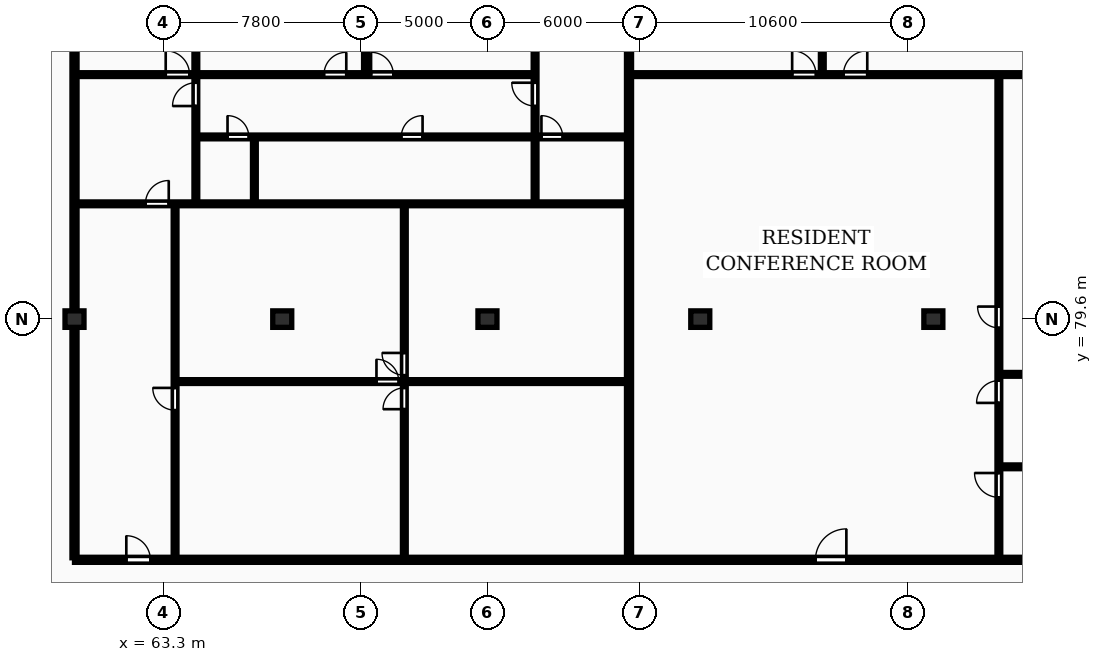
"""IFC4 building model, lengths in metres.
Left out: names, types, materials, properties, quantities, classifications, styles, units other than length and angle.
Written with IfcOpenShell. Run it as: python <this file> out.ifc"""

import sys

from ifc_helpers import new_model, si_unit, direction, frame, frame_2d, origin, origin_2d, place, context, subcontext, project, spatial, rectangle, extrude, element, fill, save


model = new_model("IFC4")
c1 = context("Model", 3, precision=1e-05, world=origin(), true_north=direction((0.0, 1.0)))
c2 = subcontext(c1, "Body", "Model", "MODEL_VIEW")
j1 = project(units=[si_unit("LENGTHUNIT", "METRE"), si_unit("PLANEANGLEUNIT", "RADIAN")], contexts=[c1])
p1 = place(None, origin())
s1 = spatial("IfcSite", under=j1, at=p1, CompositionType="ELEMENT")
p2 = place(p1, origin())
s2 = spatial("IfcBuilding", under=s1, at=p2, CompositionType="ELEMENT")
p3 = place(p2, frame((0.0, 0.0, 228.65)))
s3 = spatial("IfcBuildingStorey", under=s2, at=p3, CompositionType="ELEMENT", Elevation=228.65)
for number, where, z_axis, x_axis in (
    (1, (59.8, 79.6, 0.0), (0.0, 0.0, 1.0), (1.0, 0.0, 0.0)),
    (2, (68.0, 79.6, 0.0), (0.0, 0.0, 1.0), (1.0, 0.0, 0.0)),
    (3, (76.1, 79.6, 0.0), (0.0, 0.0, 1.0), (1.0, 0.0, 0.0)),
    (4, (84.5, 79.6, 0.0), (0.0, 0.0, 1.0), (1.0, 0.0, 0.0)),
    (5, (93.7, 79.6, 0.0), (0.0, 0.0, 1.0), (1.0, 0.0, 0.0)),
):
    element("IfcColumn", number, at=place(p3, frame(where, z_axis=z_axis, x_axis=x_axis)), inside=s3, PredefinedType="COLUMN", context=c2, shape_type="SweptSolid", body=[
        extrude(rectangle(XDim=0.75, YDim=0.65, at=origin_2d()), origin(), (0.0, 0.0, 1.0), 3.45),
    ])
p4 = place(p3, frame((59.8, 70.18, 0.0), z_axis=(0.0, 0.0, 1.0), x_axis=(0.0, 1.0, 0.0)))
e6 = element("IfcWall", 6, at=p4, inside=s3, PredefinedType="PARTITIONING", context=c2, shape_type="SweptSolid", body=[
    extrude(rectangle(XDim=24.32, YDim=0.2, at=frame_2d((12.16, 0.0))), origin(), (0.0, 0.0, 1.0), 2.477),
])
p5 = place(p3, frame((81.687, 70.18, 0.0), z_axis=(0.0, 0.0, 1.0), x_axis=(0.0, 1.0, 0.0)))
e7 = element("IfcWall", 7, at=p5, inside=s3, PredefinedType="PARTITIONING", context=c2, shape_type="SweptSolid", body=[
    extrude(rectangle(XDim=24.32, YDim=0.2, at=frame_2d((12.16, 0.0))), origin(), (0.0, 0.0, 1.0), 3.17),
])
p6 = place(p3, frame((72.819, 70.16, 0.0), z_axis=(0.0, 0.0, 1.0), x_axis=(0.0, 1.0, 0.0)))
e8 = element("IfcWall", 8, at=p6, inside=s3, PredefinedType="PARTITIONING", context=c2, shape_type="SweptSolid", body=[
    extrude(rectangle(XDim=13.95, YDim=0.15, at=frame_2d((6.975, 0.0))), origin(), (0.0, 0.0, 1.0), 3.17),
])
p7 = place(p6, frame((5.885, 0.0, 0.0)))
e9 = element("IfcOpeningElement", 9, at=p7, cuts=e8, PredefinedType="OPENING", context=c2, shape_type="SweptSolid", body=[
    extrude(rectangle(XDim=0.84, YDim=2.04, at=frame_2d((0.42, 1.02))), frame((0.0, 0.085, 0.0), z_axis=(0.0, -1.0, 0.0), x_axis=(1.0, 0.0, 0.0)), (0.0, 0.0, 1.0), 0.17),
])
p8 = place(p6, frame((7.225, 0.0, 0.0)))
e10 = element("IfcOpeningElement", 10, at=p8, cuts=e8, PredefinedType="OPENING", context=c2, shape_type="SweptSolid", body=[
    extrude(rectangle(XDim=0.88, YDim=2.06, at=frame_2d((0.44, 1.03))), frame((0.0, 0.085, 0.0), z_axis=(0.0, -1.0, 0.0), x_axis=(1.0, 0.0, 0.0)), (0.0, 0.0, 1.0), 0.17),
])
p9 = place(p3, frame((63.83, 77.135, 0.0), z_axis=(0.0, 0.0, 1.0), x_axis=(1.0, 0.0, 0.0)))
e11 = element("IfcWall", 11, at=p9, inside=s3, PredefinedType="PARTITIONING", context=c2, shape_type="SweptSolid", body=[
    extrude(rectangle(XDim=17.777, YDim=0.15, at=frame_2d((8.889, 0.0))), origin(), (0.0, 0.0, 1.0), 3.17),
])
p10 = place(p9, frame((7.889, 0.0, 0.0)))
e12 = element("IfcOpeningElement", 12, at=p10, cuts=e11, PredefinedType="OPENING", context=c2, shape_type="SweptSolid", body=[
    extrude(rectangle(XDim=0.88, YDim=2.06, at=frame_2d((0.44, 1.03))), frame((0.0, 0.085, 0.0), z_axis=(0.0, -1.0, 0.0), x_axis=(1.0, 0.0, 0.0)), (0.0, 0.0, 1.0), 0.17),
])
p11 = place(p3, frame((63.77, 70.16, 0.0), z_axis=(0.0, 0.0, 1.0), x_axis=(0.0, 1.0, 0.0)))
e13 = element("IfcWall", 13, at=p11, inside=s3, PredefinedType="PARTITIONING", context=c2, shape_type="SweptSolid", body=[
    extrude(rectangle(XDim=13.95, YDim=0.15, at=frame_2d((6.975, 0.0))), origin(), (0.0, 0.0, 1.0), 3.17),
])
p12 = place(p11, frame((5.845, 0.0, 0.0)))
e14 = element("IfcOpeningElement", 14, at=p12, cuts=e13, PredefinedType="OPENING", context=c2, shape_type="SweptSolid", body=[
    extrude(rectangle(XDim=0.88, YDim=2.06, at=frame_2d((0.44, 1.03))), frame((0.0, 0.085, 0.0), z_axis=(0.0, -1.0, 0.0), x_axis=(1.0, 0.0, 0.0)), (0.0, 0.0, 1.0), 0.17),
])
p13 = place(p3, frame((66.9, 84.19, 0.0), z_axis=(0.0, 0.0, 1.0), x_axis=(0.0, 1.0, 0.0)))
e15 = element("IfcWall", 15, at=p13, inside=s3, PredefinedType="PARTITIONING", context=c2, shape_type="SweptSolid", body=[
    extrude(rectangle(XDim=2.58, YDim=0.15, at=frame_2d((1.29, 0.0))), origin(), (0.0, 0.0, 1.0), 3.17),
])
p14 = place(p3, frame((71.285, 89.33, 0.0), z_axis=(0.0, 0.0, 1.0), x_axis=(0.0, 1.0, 0.0)))
e16 = element("IfcWall", 16, at=p14, inside=s3, PredefinedType="PARTITIONING", context=c2, shape_type="SweptSolid", body=[
    extrude(rectangle(XDim=5.17, YDim=0.15, at=frame_2d((2.585, 0.0))), origin(), (0.0, 0.0, 1.0), 3.17),
])
p15 = place(p3, frame((64.59, 84.19, 0.0), z_axis=(0.0, 0.0, 1.0), x_axis=(0.0, 1.0, 0.0)))
e17 = element("IfcWall", 17, at=p15, inside=s3, PredefinedType="PARTITIONING", context=c2, shape_type="SweptSolid", body=[
    extrude(rectangle(XDim=10.31, YDim=0.15, at=frame_2d((5.155, 0.0))), origin(), (0.0, 0.0, 1.0), 3.17),
])
p16 = place(p15, frame((3.82, 0.0, 0.0)))
e18 = element("IfcOpeningElement", 18, at=p16, cuts=e17, PredefinedType="OPENING", context=c2, shape_type="SweptSolid", body=[
    extrude(rectangle(XDim=0.92, YDim=2.08, at=frame_2d((0.46, 1.04))), frame((0.0, 0.085, 0.0), z_axis=(0.0, -1.0, 0.0), x_axis=(1.0, 0.0, 0.0)), (0.0, 0.0, 1.0), 0.17),
])
p17 = place(p3, frame((77.98, 84.19, 0.0), z_axis=(0.0, 0.0, 1.0), x_axis=(0.0, 1.0, 0.0)))
e19 = element("IfcWall", 19, at=p17, inside=s3, PredefinedType="PARTITIONING", context=c2, shape_type="SweptSolid", body=[
    extrude(rectangle(XDim=2.58, YDim=0.15, at=frame_2d((1.29, 0.0))), origin(), (0.0, 0.0, 1.0), 3.17),
])
p18 = place(p3, frame((77.98, 86.81, 0.0), z_axis=(0.0, 0.0, 1.0), x_axis=(0.0, 1.0, 0.0)))
e20 = element("IfcWall", 20, at=p18, inside=s3, PredefinedType="PARTITIONING", context=c2, shape_type="SweptSolid", body=[
    extrude(rectangle(XDim=7.69, YDim=0.15, at=frame_2d((3.845, 0.0))), origin(), (0.0, 0.0, 1.0), 3.17),
])
p19 = place(p18, frame((1.2, 0.0, 0.0)))
e21 = element("IfcOpeningElement", 21, at=p19, cuts=e20, PredefinedType="OPENING", context=c2, shape_type="SweptSolid", body=[
    extrude(rectangle(XDim=0.92, YDim=2.08, at=frame_2d((0.46, 1.04))), frame((0.0, 0.085, 0.0), z_axis=(0.0, -1.0, 0.0), x_axis=(1.0, 0.0, 0.0)), (0.0, 0.0, 1.0), 0.17),
])
p20 = place(p3, frame((64.63, 86.79, 0.0), z_axis=(0.0, 0.0, 1.0), x_axis=(1.0, 0.0, 0.0)))
e22 = element("IfcWall", 22, at=p20, inside=s3, PredefinedType="PARTITIONING", context=c2, shape_type="SweptSolid", body=[
    extrude(rectangle(XDim=16.978, YDim=0.15, at=frame_2d((8.489, 0.0))), origin(), (0.0, 0.0, 1.0), 3.17),
])
p21 = place(p20, frame((1.21, 0.0, 0.0)))
e23 = element("IfcOpeningElement", 23, at=p21, cuts=e22, PredefinedType="OPENING", context=c2, shape_type="SweptSolid", body=[
    extrude(rectangle(XDim=0.84, YDim=2.04, at=frame_2d((0.42, 1.02))), frame((0.0, 0.085, 0.0), z_axis=(0.0, -1.0, 0.0), x_axis=(1.0, 0.0, 0.0)), (0.0, 0.0, 1.0), 0.17),
])
p22 = place(p20, frame((8.069, 0.0, 0.0)))
e24 = element("IfcOpeningElement", 24, at=p22, cuts=e22, PredefinedType="OPENING", context=c2, shape_type="SweptSolid", body=[
    extrude(rectangle(XDim=0.84, YDim=2.04, at=frame_2d((0.42, 1.02))), frame((0.0, 0.085, 0.0), z_axis=(0.0, -1.0, 0.0), x_axis=(1.0, 0.0, 0.0)), (0.0, 0.0, 1.0), 0.17),
])
p23 = place(p20, frame((13.6, 0.0, 0.0)))
e25 = element("IfcOpeningElement", 25, at=p23, cuts=e22, PredefinedType="OPENING", context=c2, shape_type="SweptSolid", body=[
    extrude(rectangle(XDim=0.84, YDim=2.04, at=frame_2d((0.42, 1.02))), frame((0.0, 0.085, 0.0), z_axis=(0.0, -1.0, 0.0), x_axis=(1.0, 0.0, 0.0)), (0.0, 0.0, 1.0), 0.17),
])
p24 = place(p3, frame((59.88, 84.15, 0.0), z_axis=(0.0, 0.0, 1.0), x_axis=(1.0, 0.0, 0.0)))
e26 = element("IfcWall", 26, at=p24, inside=s3, PredefinedType="PARTITIONING", context=c2, shape_type="SweptSolid", body=[
    extrude(rectangle(XDim=21.728, YDim=0.15, at=frame_2d((10.864, 0.0))), origin(), (0.0, 0.0, 1.0), 3.17),
])
p25 = place(p24, frame((2.72, 0.0, 0.0)))
e27 = element("IfcOpeningElement", 27, at=p25, cuts=e26, PredefinedType="OPENING", context=c2, shape_type="SweptSolid", body=[
    extrude(rectangle(XDim=0.92, YDim=2.08, at=frame_2d((0.46, 1.04))), frame((0.0, 0.085, 0.0), z_axis=(0.0, -1.0, 0.0), x_axis=(1.0, 0.0, 0.0)), (0.0, 0.0, 1.0), 0.17),
])
p26 = place(p3, frame((59.88, 89.25, 0.0), z_axis=(0.0, 0.0, 1.0), x_axis=(1.0, 0.0, 0.0)))
e28 = element("IfcWall", 28, at=p26, inside=s3, PredefinedType="PARTITIONING", context=c2, shape_type="SweptSolid", body=[
    extrude(rectangle(XDim=18.1, YDim=0.15, at=frame_2d((9.05, 0.0))), origin(), (0.0, 0.0, 1.0), 3.17),
])
p27 = place(p26, frame((3.52, 0.0, 0.0)))
e29 = element("IfcOpeningElement", 29, at=p27, cuts=e28, PredefinedType="OPENING", context=c2, shape_type="SweptSolid", body=[
    extrude(rectangle(XDim=0.94, YDim=2.1, at=frame_2d((0.47, 1.05))), frame((0.0, 0.085, 0.0), z_axis=(0.0, -1.0, 0.0), x_axis=(1.0, 0.0, 0.0)), (0.0, 0.0, 1.0), 0.17),
])
p28 = place(p26, frame((9.768, 0.0, 0.0)))
e30 = element("IfcOpeningElement", 30, at=p28, cuts=e28, PredefinedType="OPENING", context=c2, shape_type="SweptSolid", body=[
    extrude(rectangle(XDim=0.88, YDim=2.06, at=frame_2d((0.44, 1.03))), frame((0.0, 0.085, 0.0), z_axis=(0.0, -1.0, 0.0), x_axis=(1.0, 0.0, 0.0)), (0.0, 0.0, 1.0), 0.17),
])
p29 = place(p26, frame((11.625, 0.0, 0.0)))
e31 = element("IfcOpeningElement", 31, at=p29, cuts=e28, PredefinedType="OPENING", context=c2, shape_type="SweptSolid", body=[
    extrude(rectangle(XDim=0.88, YDim=2.06, at=frame_2d((0.44, 1.03))), frame((0.0, 0.085, 0.0), z_axis=(0.0, -1.0, 0.0), x_axis=(1.0, 0.0, 0.0)), (0.0, 0.0, 1.0), 0.17),
])
for number, where, z_axis, x_axis in (
    (32, (96.346, 73.77, 0.0), (0.0, 0.0, 1.0), (1.0, 0.0, 0.0)),
    (33, (96.346, 77.42, 0.0), (0.0, 0.0, 1.0), (1.0, 0.0, 0.0)),
):
    element("IfcWall", number, at=place(p3, frame(where, z_axis=z_axis, x_axis=x_axis)), inside=s3, PredefinedType="PARTITIONING", context=c2, shape_type="SweptSolid", body=[
        extrude(rectangle(XDim=3.13, YDim=0.15, at=frame_2d((1.565, 0.0))), origin(), (0.0, 0.0, 1.0), 3.17),
    ])
p30 = place(p3, frame((96.286, 70.16, 0.0), z_axis=(0.0, 0.0, 1.0), x_axis=(0.0, 1.0, 0.0)))
e34 = element("IfcWall", 34, at=p30, inside=s3, PredefinedType="PARTITIONING", context=c2, shape_type="SweptSolid", body=[
    extrude(rectangle(XDim=19.03, YDim=0.15, at=frame_2d((9.515, 0.0))), origin(), (0.0, 0.0, 1.0), 3.17),
])
p31 = place(p30, frame((2.406, 0.0, 0.0)))
e35 = element("IfcOpeningElement", 35, at=p31, cuts=e34, PredefinedType="OPENING", context=c2, shape_type="SweptSolid", body=[
    extrude(rectangle(XDim=0.96, YDim=2.1, at=frame_2d((0.48, 1.05))), frame((0.0, 0.085, 0.0), z_axis=(0.0, -1.0, 0.0), x_axis=(1.0, 0.0, 0.0)), (0.0, 0.0, 1.0), 0.17),
])
p32 = place(p30, frame((6.133, 0.0, 0.0)))
e36 = element("IfcOpeningElement", 36, at=p32, cuts=e34, PredefinedType="OPENING", context=c2, shape_type="SweptSolid", body=[
    extrude(rectangle(XDim=0.88, YDim=2.06, at=frame_2d((0.44, 1.03))), frame((0.0, 0.085, 0.0), z_axis=(0.0, -1.0, 0.0), x_axis=(1.0, 0.0, 0.0)), (0.0, 0.0, 1.0), 0.17),
])
p33 = place(p30, frame((9.095, 0.0, 0.0)))
e37 = element("IfcOpeningElement", 37, at=p33, cuts=e34, PredefinedType="OPENING", context=c2, shape_type="SweptSolid", body=[
    extrude(rectangle(XDim=0.84, YDim=2.04, at=frame_2d((0.42, 1.02))), frame((0.0, 0.085, 0.0), z_axis=(0.0, -1.0, 0.0), x_axis=(1.0, 0.0, 0.0)), (0.0, 0.0, 1.0), 0.17),
])
p34 = place(p3, frame((89.316, 89.33, 0.0), z_axis=(0.0, 0.0, 1.0), x_axis=(0.0, 1.0, 0.0)))
e38 = element("IfcWall", 38, at=p34, inside=s3, PredefinedType="PARTITIONING", context=c2, shape_type="SweptSolid", body=[
    extrude(rectangle(XDim=5.17, YDim=0.15, at=frame_2d((2.585, 0.0))), origin(), (0.0, 0.0, 1.0), 3.17),
])
p35 = place(p3, frame((81.767, 89.25, 0.0), z_axis=(0.0, 0.0, 1.0), x_axis=(1.0, 0.0, 0.0)))
e39 = element("IfcWall", 39, at=p35, inside=s3, PredefinedType="PARTITIONING", context=c2, shape_type="SweptSolid", body=[
    extrude(rectangle(XDim=17.708, YDim=0.15, at=frame_2d((8.854, 0.0))), origin(), (0.0, 0.0, 1.0), 3.17),
])
p36 = place(p35, frame((6.359, 0.0, 0.0)))
e40 = element("IfcOpeningElement", 40, at=p36, cuts=e39, PredefinedType="OPENING", context=c2, shape_type="SweptSolid", body=[
    extrude(rectangle(XDim=0.94, YDim=2.1, at=frame_2d((0.47, 1.05))), frame((0.0, 0.085, 0.0), z_axis=(0.0, -1.0, 0.0), x_axis=(1.0, 0.0, 0.0)), (0.0, 0.0, 1.0), 0.17),
])
p37 = place(p35, frame((8.384, 0.0, 0.0)))
e41 = element("IfcOpeningElement", 41, at=p37, cuts=e39, PredefinedType="OPENING", context=c2, shape_type="SweptSolid", body=[
    extrude(rectangle(XDim=0.94, YDim=2.1, at=frame_2d((0.47, 1.05))), frame((0.0, 0.085, 0.0), z_axis=(0.0, -1.0, 0.0), x_axis=(1.0, 0.0, 0.0)), (0.0, 0.0, 1.0), 0.17),
])
p38 = place(p3, frame((59.8, 70.1, 0.0), z_axis=(0.0, 0.0, 1.0), x_axis=(1.0, 0.0, 0.0)))
e42 = element("IfcWall", 42, at=p38, inside=s3, PredefinedType="PARTITIONING", context=c2, shape_type="SweptSolid", body=[
    extrude(rectangle(XDim=68.6, YDim=0.2, at=frame_2d((34.3, 0.0))), origin(), (0.0, 0.0, 1.0), 3.17),
])
p39 = place(p38, frame((2.045, 0.0, 0.0)))
e43 = element("IfcOpeningElement", 43, at=p39, cuts=e42, PredefinedType="OPENING", context=c2, shape_type="SweptSolid", body=[
    extrude(rectangle(XDim=0.95, YDim=2.15, at=frame_2d((0.475, 1.075))), frame((0.0, 0.11, 0.0), z_axis=(0.0, -1.0, 0.0), x_axis=(1.0, 0.0, 0.0)), (0.0, 0.0, 1.0), 0.22),
])
p40 = place(p38, frame((29.246, 0.0, 0.0)))
e44 = element("IfcOpeningElement", 44, at=p40, cuts=e42, PredefinedType="OPENING", context=c2, shape_type="SweptSolid", body=[
    extrude(rectangle(XDim=1.22, YDim=2.18, at=frame_2d((0.61, 1.09))), frame((0.0, 0.11, 0.0), z_axis=(0.0, -1.0, 0.0), x_axis=(1.0, 0.0, 0.0)), (0.0, 0.0, 1.0), 0.22),
])
p41 = place(p38, frame((41.801, 0.0, 0.0)))
e45 = element("IfcOpeningElement", 45, at=p41, cuts=e42, PredefinedType="OPENING", context=c2, shape_type="SweptSolid", body=[
    extrude(rectangle(XDim=0.95, YDim=2.15, at=frame_2d((0.475, 1.075))), frame((0.0, 0.11, 0.0), z_axis=(0.0, -1.0, 0.0), x_axis=(1.0, 0.0, 0.0)), (0.0, 0.0, 1.0), 0.22),
])
p42 = place(p38, frame((59.115, 0.0, 0.0)))
e46 = element("IfcOpeningElement", 46, at=p42, cuts=e42, PredefinedType="OPENING", context=c2, shape_type="SweptSolid", body=[
    extrude(rectangle(XDim=0.95, YDim=2.15, at=frame_2d((0.475, 1.075))), frame((0.0, 0.11, 0.0), z_axis=(0.0, -1.0, 0.0), x_axis=(1.0, 0.0, 0.0)), (0.0, 0.0, 1.0), 0.22),
])
p43 = place(p7, origin())
e47 = element("IfcDoor", 47, at=p43, inside=s3, OperationType="SINGLE_SWING_LEFT", PredefinedType="DOOR", context=c2, shape_type="SweptSolid", body=[
    extrude(rectangle(XDim=0.84, YDim=2.04, at=frame_2d((0.42, 1.02))), frame((0.0, 0.025, 0.0), z_axis=(0.0, -1.0, 0.0), x_axis=(1.0, 0.0, 0.0)), (0.0, 0.0, 1.0), 0.05),
])
fill(e9, e47)
p44 = place(p8, origin())
e48 = element("IfcDoor", 48, at=p44, inside=s3, OperationType="SINGLE_SWING_RIGHT", PredefinedType="DOOR", context=c2, shape_type="SweptSolid", body=[
    extrude(rectangle(XDim=0.88, YDim=2.06, at=frame_2d((0.44, 1.03))), frame((0.0, 0.025, 0.0), z_axis=(0.0, -1.0, 0.0), x_axis=(1.0, 0.0, 0.0)), (0.0, 0.0, 1.0), 0.05),
])
fill(e10, e48)
p45 = place(p10, origin())
e49 = element("IfcDoor", 49, at=p45, inside=s3, OperationType="SINGLE_SWING_LEFT", PredefinedType="DOOR", context=c2, shape_type="SweptSolid", body=[
    extrude(rectangle(XDim=0.88, YDim=2.06, at=frame_2d((0.44, 1.03))), frame((0.0, 0.025, 0.0), z_axis=(0.0, -1.0, 0.0), x_axis=(1.0, 0.0, 0.0)), (0.0, 0.0, 1.0), 0.05),
])
fill(e12, e49)
p46 = place(p12, origin())
e50 = element("IfcDoor", 50, at=p46, inside=s3, OperationType="SINGLE_SWING_RIGHT", PredefinedType="DOOR", context=c2, shape_type="SweptSolid", body=[
    extrude(rectangle(XDim=0.88, YDim=2.06, at=frame_2d((0.44, 1.03))), frame((0.0, 0.025, 0.0), z_axis=(0.0, -1.0, 0.0), x_axis=(1.0, 0.0, 0.0)), (0.0, 0.0, 1.0), 0.05),
])
fill(e14, e50)
p47 = place(p16, origin())
e51 = element("IfcDoor", 51, at=p47, inside=s3, OperationType="SINGLE_SWING_LEFT", PredefinedType="DOOR", context=c2, shape_type="SweptSolid", body=[
    extrude(rectangle(XDim=0.92, YDim=2.08, at=frame_2d((0.46, 1.04))), frame((0.0, 0.025, 0.0), z_axis=(0.0, -1.0, 0.0), x_axis=(1.0, 0.0, 0.0)), (0.0, 0.0, 1.0), 0.05),
])
fill(e18, e51)
p48 = place(p19, origin())
e52 = element("IfcDoor", 52, at=p48, inside=s3, OperationType="SINGLE_SWING_RIGHT", PredefinedType="DOOR", context=c2, shape_type="SweptSolid", body=[
    extrude(rectangle(XDim=0.92, YDim=2.08, at=frame_2d((0.46, 1.04))), frame((0.0, 0.025, 0.0), z_axis=(0.0, -1.0, 0.0), x_axis=(1.0, 0.0, 0.0)), (0.0, 0.0, 1.0), 0.05),
])
fill(e21, e52)
p49 = place(p21, origin())
e53 = element("IfcDoor", 53, at=p49, inside=s3, OperationType="SINGLE_SWING_LEFT", PredefinedType="DOOR", context=c2, shape_type="SweptSolid", body=[
    extrude(rectangle(XDim=0.84, YDim=2.04, at=frame_2d((0.42, 1.02))), frame((0.0, 0.025, 0.0), z_axis=(0.0, -1.0, 0.0), x_axis=(1.0, 0.0, 0.0)), (0.0, 0.0, 1.0), 0.05),
])
fill(e23, e53)
p50 = place(p22, origin())
e54 = element("IfcDoor", 54, at=p50, inside=s3, OperationType="SINGLE_SWING_RIGHT", PredefinedType="DOOR", context=c2, shape_type="SweptSolid", body=[
    extrude(rectangle(XDim=0.84, YDim=2.04, at=frame_2d((0.42, 1.02))), frame((0.0, 0.025, 0.0), z_axis=(0.0, -1.0, 0.0), x_axis=(1.0, 0.0, 0.0)), (0.0, 0.0, 1.0), 0.05),
])
fill(e24, e54)
p51 = place(p23, origin())
e55 = element("IfcDoor", 55, at=p51, inside=s3, OperationType="SINGLE_SWING_LEFT", PredefinedType="DOOR", context=c2, shape_type="SweptSolid", body=[
    extrude(rectangle(XDim=0.84, YDim=2.04, at=frame_2d((0.42, 1.02))), frame((0.0, 0.025, 0.0), z_axis=(0.0, -1.0, 0.0), x_axis=(1.0, 0.0, 0.0)), (0.0, 0.0, 1.0), 0.05),
])
fill(e25, e55)
p52 = place(p25, origin())
e56 = element("IfcDoor", 56, at=p52, inside=s3, OperationType="SINGLE_SWING_RIGHT", PredefinedType="DOOR", context=c2, shape_type="SweptSolid", body=[
    extrude(rectangle(XDim=0.92, YDim=2.08, at=frame_2d((0.46, 1.04))), frame((0.0, 0.025, 0.0), z_axis=(0.0, -1.0, 0.0), x_axis=(1.0, 0.0, 0.0)), (0.0, 0.0, 1.0), 0.05),
])
fill(e27, e56)
p53 = place(p27, origin())
e57 = element("IfcDoor", 57, at=p53, inside=s3, OperationType="SINGLE_SWING_LEFT", PredefinedType="DOOR", context=c2, shape_type="SweptSolid", body=[
    extrude(rectangle(XDim=0.94, YDim=2.1, at=frame_2d((0.47, 1.05))), frame((0.0, 0.025, 0.0), z_axis=(0.0, -1.0, 0.0), x_axis=(1.0, 0.0, 0.0)), (0.0, 0.0, 1.0), 0.05),
])
fill(e29, e57)
p54 = place(p28, origin())
e58 = element("IfcDoor", 58, at=p54, inside=s3, OperationType="SINGLE_SWING_RIGHT", PredefinedType="DOOR", context=c2, shape_type="SweptSolid", body=[
    extrude(rectangle(XDim=0.88, YDim=2.06, at=frame_2d((0.44, 1.03))), frame((0.0, 0.025, 0.0), z_axis=(0.0, -1.0, 0.0), x_axis=(1.0, 0.0, 0.0)), (0.0, 0.0, 1.0), 0.05),
])
fill(e30, e58)
p55 = place(p29, origin())
e59 = element("IfcDoor", 59, at=p55, inside=s3, OperationType="SINGLE_SWING_LEFT", PredefinedType="DOOR", context=c2, shape_type="SweptSolid", body=[
    extrude(rectangle(XDim=0.88, YDim=2.06, at=frame_2d((0.44, 1.03))), frame((0.0, 0.025, 0.0), z_axis=(0.0, -1.0, 0.0), x_axis=(1.0, 0.0, 0.0)), (0.0, 0.0, 1.0), 0.05),
])
fill(e31, e59)
p56 = place(p31, origin())
e60 = element("IfcDoor", 60, at=p56, inside=s3, OperationType="SINGLE_SWING_RIGHT", PredefinedType="DOOR", context=c2, shape_type="SweptSolid", body=[
    extrude(rectangle(XDim=0.96, YDim=2.1, at=frame_2d((0.48, 1.05))), frame((0.0, 0.025, 0.0), z_axis=(0.0, -1.0, 0.0), x_axis=(1.0, 0.0, 0.0)), (0.0, 0.0, 1.0), 0.05),
])
fill(e35, e60)
p57 = place(p32, origin())
e61 = element("IfcDoor", 61, at=p57, inside=s3, OperationType="SINGLE_SWING_LEFT", PredefinedType="DOOR", context=c2, shape_type="SweptSolid", body=[
    extrude(rectangle(XDim=0.88, YDim=2.06, at=frame_2d((0.44, 1.03))), frame((0.0, 0.025, 0.0), z_axis=(0.0, -1.0, 0.0), x_axis=(1.0, 0.0, 0.0)), (0.0, 0.0, 1.0), 0.05),
])
fill(e36, e61)
p58 = place(p33, origin())
e62 = element("IfcDoor", 62, at=p58, inside=s3, OperationType="SINGLE_SWING_RIGHT", PredefinedType="DOOR", context=c2, shape_type="SweptSolid", body=[
    extrude(rectangle(XDim=0.84, YDim=2.04, at=frame_2d((0.42, 1.02))), frame((0.0, 0.025, 0.0), z_axis=(0.0, -1.0, 0.0), x_axis=(1.0, 0.0, 0.0)), (0.0, 0.0, 1.0), 0.05),
])
fill(e37, e62)
p59 = place(p36, origin())
e63 = element("IfcDoor", 63, at=p59, inside=s3, OperationType="SINGLE_SWING_LEFT", PredefinedType="DOOR", context=c2, shape_type="SweptSolid", body=[
    extrude(rectangle(XDim=0.94, YDim=2.1, at=frame_2d((0.47, 1.05))), frame((0.0, 0.025, 0.0), z_axis=(0.0, -1.0, 0.0), x_axis=(1.0, 0.0, 0.0)), (0.0, 0.0, 1.0), 0.05),
])
fill(e40, e63)
p60 = place(p37, origin())
e64 = element("IfcDoor", 64, at=p60, inside=s3, OperationType="SINGLE_SWING_RIGHT", PredefinedType="DOOR", context=c2, shape_type="SweptSolid", body=[
    extrude(rectangle(XDim=0.94, YDim=2.1, at=frame_2d((0.47, 1.05))), frame((0.0, 0.025, 0.0), z_axis=(0.0, -1.0, 0.0), x_axis=(1.0, 0.0, 0.0)), (0.0, 0.0, 1.0), 0.05),
])
fill(e41, e64)
p61 = place(p39, origin())
e65 = element("IfcDoor", 65, at=p61, inside=s3, OperationType="SINGLE_SWING_LEFT", PredefinedType="DOOR", context=c2, shape_type="SweptSolid", body=[
    extrude(rectangle(XDim=0.95, YDim=2.15, at=frame_2d((0.475, 1.075))), frame((0.0, 0.025, 0.0), z_axis=(0.0, -1.0, 0.0), x_axis=(1.0, 0.0, 0.0)), (0.0, 0.0, 1.0), 0.05),
])
fill(e43, e65)
p62 = place(p40, origin())
e66 = element("IfcDoor", 66, at=p62, inside=s3, OperationType="SINGLE_SWING_RIGHT", PredefinedType="DOOR", context=c2, shape_type="SweptSolid", body=[
    extrude(rectangle(XDim=1.22, YDim=2.18, at=frame_2d((0.61, 1.09))), frame((0.0, 0.025, 0.0), z_axis=(0.0, -1.0, 0.0), x_axis=(1.0, 0.0, 0.0)), (0.0, 0.0, 1.0), 0.05),
])
fill(e44, e66)
save(model, sys.argv[1])
